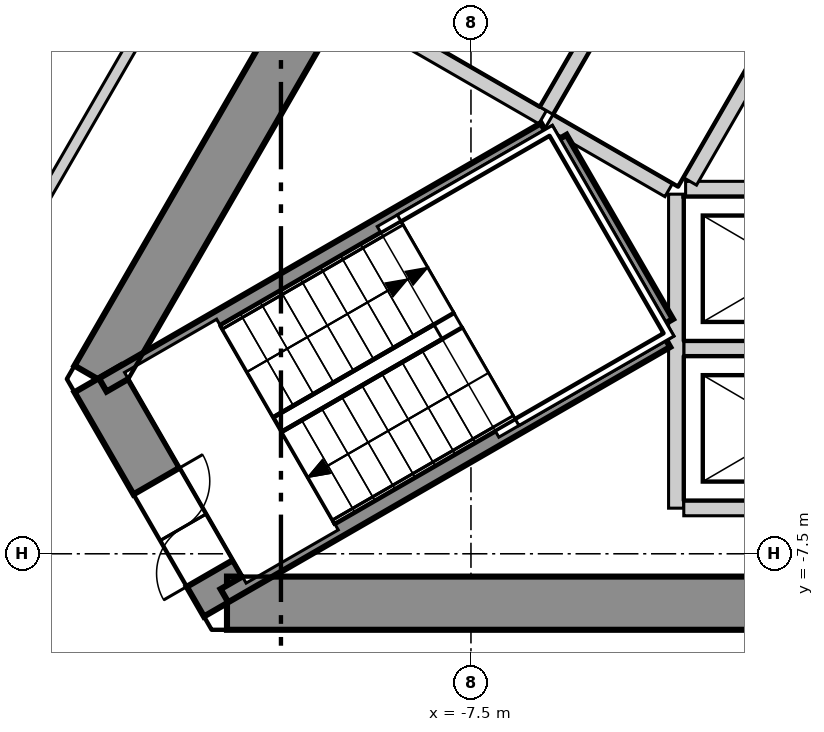
"""IFC4 building model, lengths in metres.
Left out: names, types, materials, properties, quantities, classifications, styles, units other than length and angle.
Written with IfcOpenShell. Run it as: python <this file> out.ifc"""

import sys

from ifc_helpers import new_model, si_unit, direction, frame, frame_2d, origin, place, context, subcontext, project, spatial, polyline, rectangle, outline, extrude, element, fill, save


model = new_model("IFC4")
c1 = context("Model", 3, precision=1e-05, world=origin(), true_north=direction((0.0, 1.0)))
c2 = subcontext(c1, "Body", "Model", "MODEL_VIEW")
j1 = project(units=[si_unit("LENGTHUNIT", "METRE"), si_unit("PLANEANGLEUNIT", "RADIAN")], contexts=[c1])
p1 = place(None, origin())
s1 = spatial("IfcSite", under=j1, at=p1, CompositionType="ELEMENT")
p2 = place(p1, origin())
s2 = spatial("IfcBuilding", under=s1, at=p2, CompositionType="ELEMENT")
p3 = place(p2, frame((0.0, 0.0, 255.8)))
s3 = spatial("IfcBuildingStorey", under=s2, at=p3, CompositionType="ELEMENT", Elevation=255.8)
p4 = place(p3, frame((-1.703, 13.35, -0.6), z_axis=(0.0, 0.0, 1.0), x_axis=(-0.500011533395, -0.866018744874, 0.0)))
e1 = element("IfcWall", 1, at=p4, inside=s3, PredefinedType="SHEAR", context=c2, shape_type="SweptSolid", body=[
    extrude(outline(polyline([(-0.202, -0.35), (1.782, -0.35), (3.766, -0.35), (5.75, -0.35), (7.734, -0.35), (9.718, -0.35), (11.702, -0.35), (13.686, -0.35), (15.67, -0.35), (17.654, -0.35), (19.638, -0.35), (21.622, -0.35), (21.218, 0.35), (19.307, 0.35), (17.397, 0.35), (15.486, 0.35), (13.576, 0.35), (11.665, 0.35), (9.755, 0.35), (7.844, 0.35), (5.934, 0.35), (4.023, 0.35), (2.113, 0.35), (0.202, 0.35), (-0.202, -0.35)])), origin(), (0.0, 0.0, 1.0), 6.3),
])
p5 = place(p4, frame((10.16, 0.0, 0.6)))
e2 = element("IfcOpeningElement", 2, at=p5, cuts=e1, PredefinedType="OPENING", context=c2, shape_type="SweptSolid", body=[
    extrude(rectangle(XDim=1.1, YDim=2.1, at=frame_2d((0.55, 1.05))), frame((0.0, 0.36, 0.0), z_axis=(0.0, -1.0, 0.0), x_axis=(1.0, 0.0, 0.0)), (0.0, 0.0, 1.0), 0.72),
])
p6 = place(p3, frame((-12.413, -5.2, -0.6), z_axis=(0.0, 0.0, 1.0), x_axis=(0.49999337185, -0.866029230515, 0.0)))
e3 = element("IfcWall", 3, at=p6, inside=s3, PredefinedType="SHEAR", context=c2, shape_type="SweptSolid", body=[
    extrude(outline(polyline([(-0.202, -0.35), (1.703, -0.35), (3.608, -0.35), (3.204, 0.35), (1.703, 0.35), (0.202, 0.35), (-0.202, -0.35)])), origin(), (0.0, 0.0, 1.0), 6.3),
])
p7 = place(p6, frame((1.553, 0.0, 0.6)))
e4 = element("IfcOpeningElement", 4, at=p7, cuts=e3, PredefinedType="OPENING", context=c2, shape_type="SweptSolid", body=[
    extrude(rectangle(XDim=1.4, YDim=2.1, at=frame_2d((0.7, 1.05))), frame((0.0, 0.36, 0.0), z_axis=(0.0, -1.0, 0.0), x_axis=(1.0, 0.0, 0.0)), (0.0, 0.0, 1.0), 0.72),
])
p8 = place(p3, frame((-10.71, -8.15, -0.6), z_axis=(0.0, 0.0, 1.0), x_axis=(1.0, 0.0, 0.0)))
e5 = element("IfcWall", 5, at=p8, inside=s3, PredefinedType="SHEAR", context=c2, shape_type="SweptSolid", body=[
    extrude(outline(polyline([(-0.202, -0.35), (1.782, -0.35), (3.766, -0.35), (5.75, -0.35), (7.734, -0.35), (9.718, -0.35), (11.702, -0.35), (13.686, -0.35), (15.67, -0.35), (17.654, -0.35), (19.638, -0.35), (21.622, -0.35), (21.218, 0.35), (19.307, 0.35), (17.397, 0.35), (15.486, 0.35), (13.576, 0.35), (11.665, 0.35), (9.755, 0.35), (7.844, 0.35), (5.934, 0.35), (4.023, 0.35), (2.113, 0.35), (0.202, 0.35), (-0.202, -0.35)])), origin(), (0.0, 0.0, 1.0), 6.3),
])
p9 = place(p8, frame((9.81, 0.0, 0.6)))
e6 = element("IfcOpeningElement", 6, at=p9, cuts=e5, PredefinedType="OPENING", context=c2, shape_type="SweptSolid", body=[
    extrude(rectangle(XDim=1.8, YDim=2.1, at=frame_2d((0.9, 1.05))), frame((0.0, 0.36, 0.0), z_axis=(0.0, -1.0, 0.0), x_axis=(1.0, 0.0, 0.0)), (0.0, 0.0, 1.0), 0.72),
])
p10 = place(p3, frame((-14.491, -5.2, 0.0), z_axis=(0.0, 0.0, 1.0), x_axis=(0.50001247681, 0.866018200175, 0.0)))
e7 = element("IfcWall", 7, at=p10, inside=s3, PredefinedType="PARTITIONING", context=c2, shape_type="SweptSolid", body=[
    extrude(rectangle(XDim=6.874, YDim=0.15, at=frame_2d((3.437, 0.0))), origin(), (0.0, 0.0, 1.0), 5.7),
])
p11 = place(p3, frame((-8.376, -0.707, 0.0), z_axis=(0.0, 0.0, 1.0), x_axis=(0.866067520717, -0.499927044236, 0.0)))
e8 = element("IfcWall", 8, at=p11, inside=s3, PredefinedType="SOLIDWALL", context=c2, shape_type="SweptSolid", body=[
    extrude(rectangle(XDim=2.1, YDim=0.2, at=frame_2d((1.05, 0.0))), origin(), (0.0, 0.0, 1.0), 5.7),
])
p12 = place(p3, frame((-4.7, -4.8, 0.0), z_axis=(0.0, 0.0, 1.0), x_axis=(1.0, 0.0, 0.0)))
e9 = element("IfcWall", 9, at=p12, inside=s3, PredefinedType="SOLIDWALL", context=c2, shape_type="SweptSolid", body=[
    extrude(rectangle(XDim=2.9, YDim=0.2, at=frame_2d((1.45, 0.0))), origin(), (0.0, 0.0, 1.0), 5.7),
])
p13 = place(p3, frame((-4.8, -6.9, 0.0), z_axis=(0.0, 0.0, 1.0), x_axis=(0.0, 1.0, 0.0)))
e10 = element("IfcWall", 10, at=p13, inside=s3, PredefinedType="SOLIDWALL", context=c2, shape_type="SweptSolid", body=[
    extrude(rectangle(XDim=4.131, YDim=0.2, at=frame_2d((2.065, 0.0))), origin(), (0.0, 0.0, 1.0), 5.7),
])
p14 = place(p3, frame((-4.7, -6.9, 0.0), z_axis=(0.0, 0.0, 1.0), x_axis=(1.0, 0.0, 0.0)))
e11 = element("IfcWall", 11, at=p14, inside=s3, PredefinedType="SOLIDWALL", context=c2, shape_type="SweptSolid", body=[
    extrude(rectangle(XDim=2.9, YDim=0.2, at=frame_2d((1.45, 0.0))), origin(), (0.0, 0.0, 1.0), 5.7),
])
p15 = place(p3, frame((-4.676, -2.7, 0.0), z_axis=(0.0, 0.0, 1.0), x_axis=(1.0, 0.0, 0.0)))
e12 = element("IfcWall", 12, at=p15, inside=s3, PredefinedType="SOLIDWALL", context=c2, shape_type="SweptSolid", body=[
    extrude(rectangle(XDim=2.873, YDim=0.2, at=frame_2d((1.437, 0.0))), origin(), (0.0, 0.0, 1.0), 5.7),
])
p16 = place(p15, frame((0.937, 0.0, 0.0)))
e13 = element("IfcOpeningElement", 13, at=p16, cuts=e12, PredefinedType="OPENING", context=c2, shape_type="SweptSolid", body=[
    extrude(rectangle(XDim=1.1, YDim=2.1, at=frame_2d((0.55, 1.05))), frame((0.0, 0.11, 0.0), z_axis=(0.0, -1.0, 0.0), x_axis=(1.0, 0.0, 0.0)), (0.0, 0.0, 1.0), 0.22),
])
p17 = place(p3, frame((-6.507, -1.67, 0.0), z_axis=(0.0, 0.0, 1.0), x_axis=(0.50012328804, 0.865954211699, 0.0)))
e14 = element("IfcWall", 14, at=p17, inside=s3, PredefinedType="SOLIDWALL", context=c2, shape_type="SweptSolid", body=[
    extrude(rectangle(XDim=2.9, YDim=0.2, at=frame_2d((1.45, 0.0))), origin(), (0.0, 0.0, 1.0), 5.7),
])
p18 = place(p3, frame((-6.47, -1.807, 0.0), z_axis=(0.0, 0.0, 1.0), x_axis=(0.865883195159, -0.500246231712, 0.0)))
e15 = element("IfcWall", 15, at=p18, inside=s3, PredefinedType="SOLIDWALL", context=c2, shape_type="SweptSolid", body=[
    extrude(rectangle(XDim=1.815, YDim=0.2, at=frame_2d((0.908, 0.0))), origin(), (0.0, 0.0, 1.0), 5.7),
])
p19 = place(p3, frame((-4.619, -2.6, 0.0), z_axis=(0.0, 0.0, 1.0), x_axis=(0.50009492287, 0.865970593103, 0.0)))
e16 = element("IfcWall", 16, at=p19, inside=s3, PredefinedType="SOLIDWALL", context=c2, shape_type="SweptSolid", body=[
    extrude(rectangle(XDim=2.761, YDim=0.2, at=frame_2d((1.381, 0.0))), origin(), (0.0, 0.0, 1.0), 5.7),
])
p20 = place(p3, frame((-12.344, -5.279, 0.0), z_axis=(0.0, 0.0, 1.0), x_axis=(0.866046323291, 0.499963764601, 0.0)))
e17 = element("IfcWall", 17, at=p20, inside=s3, PredefinedType="SOLIDWALL", context=c2, shape_type="SweptSolid", body=[
    extrude(rectangle(XDim=6.714, YDim=0.2, at=frame_2d((3.357, 0.0))), origin(), (0.0, 0.0, 1.0), 5.7),
])
p21 = place(p3, frame((-6.329, -2.038, 0.0), z_axis=(0.0, 0.0, 1.0), x_axis=(0.500200581029, -0.865909567298, 0.0)))
e18 = element("IfcWall", 18, at=p21, inside=s3, PredefinedType="SOLIDWALL", context=c2, shape_type="SweptSolid", body=[
    extrude(rectangle(XDim=2.799, YDim=0.2, at=frame_2d((1.399, 0.0))), origin(), (0.0, 0.0, 1.0), 5.7),
])
p22 = place(p3, frame((-10.744, -8.051, 0.0), z_axis=(0.0, 0.0, 1.0), x_axis=(0.865983344943, 0.500072840975, 0.0)))
e19 = element("IfcWall", 19, at=p22, inside=s3, PredefinedType="SOLIDWALL", context=c2, shape_type="SweptSolid", body=[
    extrude(rectangle(XDim=6.715, YDim=0.2, at=frame_2d((3.357, 0.0))), origin(), (0.0, 0.0, 1.0), 5.7),
])
p23 = place(p7, origin())
e20 = element("IfcDoor", 20, at=p23, inside=s3, OperationType="DOUBLE_DOOR_SINGLE_SWING", PredefinedType="DOOR", context=c2, shape_type="SweptSolid", body=[
    extrude(rectangle(XDim=1.4, YDim=2.1, at=frame_2d((0.7, 1.05))), frame((0.0, 0.025, 0.0), z_axis=(0.0, -1.0, 0.0), x_axis=(1.0, 0.0, 0.0)), (0.0, 0.0, 1.0), 0.05),
])
fill(e4, e20)
save(model, sys.argv[1])
